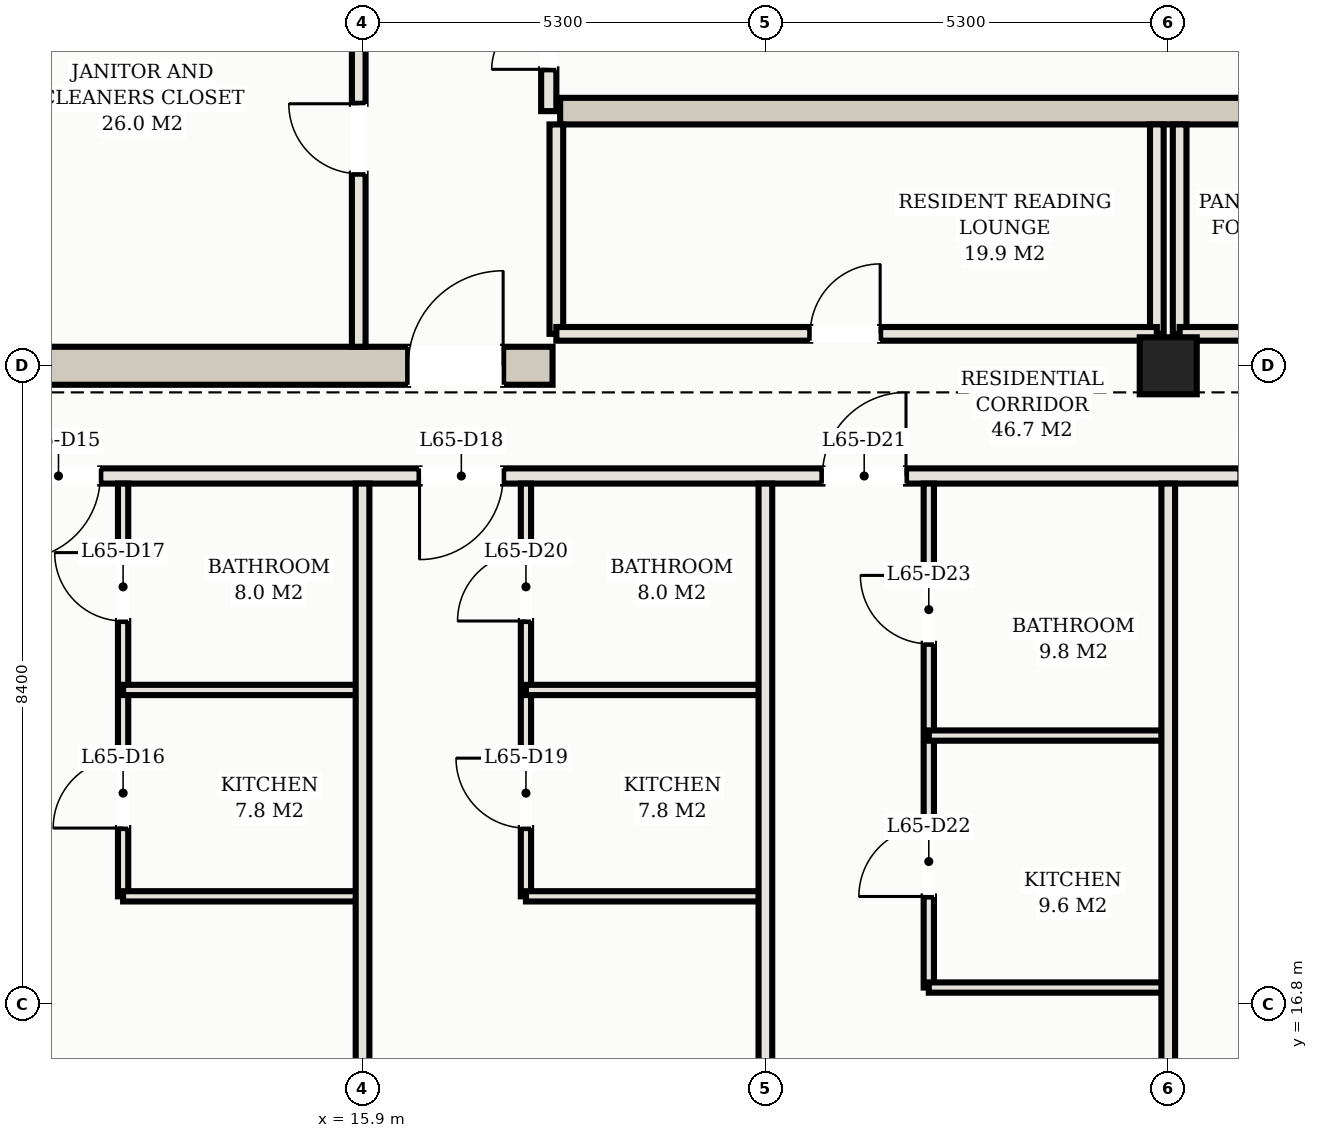
"""IFC4 building model, lengths in metres.
Left out: names, types, materials, properties, quantities, classifications, styles, units other than length and angle.
Written with IfcOpenShell. Run it as: python <this file> out.ifc"""

import sys

from ifc_helpers import new_model, si_unit, direction, frame, frame_2d, origin, origin_2d, place, context, subcontext, project, spatial, rectangle, hollow_rectangle, extrude, element, fill, save


model = new_model("IFC4")
c1 = context("Model", 3, precision=1e-05, world=origin(), true_north=direction((0.0, 1.0)))
c2 = subcontext(c1, "Body", "Model", "MODEL_VIEW")
j1 = project(units=[si_unit("LENGTHUNIT", "METRE"), si_unit("PLANEANGLEUNIT", "RADIAN")], contexts=[c1])
p1 = place(None, origin())
s1 = spatial("IfcSite", under=j1, at=p1, CompositionType="ELEMENT")
p2 = place(p1, origin())
s2 = spatial("IfcBuilding", under=s1, at=p2, CompositionType="ELEMENT")
p3 = place(p2, frame((0.0, 0.0, 236.3)))
s3 = spatial("IfcBuildingStorey", under=s2, at=p3, CompositionType="ELEMENT", Elevation=236.3)
p4 = place(p3, frame((10.35, 25.2, 0.0), z_axis=(0.0, 0.0, 1.0), x_axis=(1.0, 0.0, 0.0)))
e1 = element("IfcWall", 1, at=p4, inside=s3, PredefinedType="SHEAR", context=c2, shape_type="SweptSolid", body=[
    extrude(rectangle(XDim=8.05, YDim=0.5, at=frame_2d((4.025, 0.0))), origin(), (0.0, 0.0, 1.0), 3.11),
])
p5 = place(p4, frame((6.15, 0.0, 0.0)))
e2 = element("IfcOpeningElement", 2, at=p5, cuts=e1, PredefinedType="OPENING", context=c2, shape_type="SweptSolid", body=[
    extrude(rectangle(XDim=1.25, YDim=2.2, at=frame_2d((0.625, 1.1))), frame((0.0, 0.26, 0.0), z_axis=(0.0, -1.0, 0.0), x_axis=(1.0, 0.0, 0.0)), (0.0, 0.0, 1.0), 0.52),
])
p6 = place(p3, frame((18.5, 28.55, 0.0), z_axis=(0.0, 0.0, 1.0), x_axis=(1.0, 0.0, 0.0)))
e3 = element("IfcWall", 3, at=p6, inside=s3, PredefinedType="SHEAR", context=c2, shape_type="SweptSolid", body=[
    extrude(rectangle(XDim=16.0, YDim=0.35, at=frame_2d((8.0, 0.0))), origin(), (0.0, 0.0, 1.0), 3.11),
])
p7 = place(p3, frame((26.5, 25.2, 0.0), z_axis=(0.0, 0.0, 1.0), x_axis=(1.0, 0.0, 0.0)))
e4 = element("IfcColumn", 4, at=p7, inside=s3, PredefinedType="COLUMN", context=c2, shape_type="SweptSolid", body=[
    extrude(hollow_rectangle(XDim=0.75, YDim=0.75, WallThickness=0.025, at=origin_2d()), origin(), (0.0, 0.0, 1.0), 3.3),
])
p8 = place(p3, frame((15.85, 25.45, 0.0), z_axis=(0.0, 0.0, 1.0), x_axis=(0.0, 1.0, 0.0)))
e5 = element("IfcWall", 5, at=p8, inside=s3, PredefinedType="PARTITIONING", context=c2, shape_type="SweptSolid", body=[
    extrude(rectangle(XDim=5.475, YDim=0.18, at=frame_2d((2.738, 0.0))), origin(), (0.0, 0.0, 1.0), 2.45),
])
p9 = place(p8, frame((2.277, 0.0, 0.0)))
e6 = element("IfcOpeningElement", 6, at=p9, cuts=e5, PredefinedType="OPENING", context=c2, shape_type="SweptSolid", body=[
    extrude(rectangle(XDim=0.92, YDim=2.15, at=frame_2d((0.46, 1.075))), frame((0.0, 0.1, 0.0), z_axis=(0.0, -1.0, 0.0), x_axis=(1.0, 0.0, 0.0)), (0.0, 0.0, 1.0), 0.2),
])
p10 = place(p3, frame((18.35, 28.55, 0.0), z_axis=(0.0, 0.0, 1.0), x_axis=(0.0, 1.0, 0.0)))
e7 = element("IfcWall", 7, at=p10, inside=s3, PredefinedType="PARTITIONING", context=c2, shape_type="SweptSolid", body=[
    extrude(rectangle(XDim=2.6, YDim=0.2, at=frame_2d((1.3, 0.0))), origin(), (0.0, 0.0, 1.0), 2.45),
])
p11 = place(p10, frame((0.55, 0.0, 0.0)))
e8 = element("IfcOpeningElement", 8, at=p11, cuts=e7, PredefinedType="OPENING", context=c2, shape_type="SweptSolid", body=[
    extrude(rectangle(XDim=1.5, YDim=2.25, at=frame_2d((0.75, 1.125))), frame((0.0, 0.11, 0.0), z_axis=(0.0, -1.0, 0.0), x_axis=(1.0, 0.0, 0.0)), (0.0, 0.0, 1.0), 0.22),
])
for number, where, z_axis, x_axis in (
    (9, (18.45, 25.62, 0.0), (0.0, 0.0, 1.0), (0.0, 1.0, 0.0)),
    (10, (26.35, 25.62, 0.0), (0.0, 0.0, 1.0), (0.0, 1.0, 0.0)),
):
    element("IfcWall", number, at=place(p3, frame(where, z_axis=z_axis, x_axis=x_axis)), inside=s3, PredefinedType="PARTITIONING", context=c2, shape_type="SweptSolid", body=[
        extrude(rectangle(XDim=2.755, YDim=0.18, at=frame_2d((1.377, 0.0))), origin(), (0.0, 0.0, 1.0), 2.45),
    ])
p12 = place(p3, frame((18.45, 25.62, 0.0), z_axis=(0.0, 0.0, 1.0), x_axis=(1.0, 0.0, 0.0)))
e11 = element("IfcWall", 11, at=p12, inside=s3, PredefinedType="PARTITIONING", context=c2, shape_type="SweptSolid", body=[
    extrude(rectangle(XDim=7.9, YDim=0.18, at=frame_2d((3.95, 0.0))), origin(), (0.0, 0.0, 1.0), 2.45),
])
p13 = place(p12, frame((3.34, 0.0, 0.0)))
e12 = element("IfcOpeningElement", 12, at=p13, cuts=e11, PredefinedType="OPENING", context=c2, shape_type="SweptSolid", body=[
    extrude(rectangle(XDim=0.92, YDim=2.15, at=frame_2d((0.46, 1.075))), frame((0.0, 0.1, 0.0), z_axis=(0.0, -1.0, 0.0), x_axis=(1.0, 0.0, 0.0)), (0.0, 0.0, 1.0), 0.2),
])
p14 = place(p3, frame((26.65, 25.62, 0.0), z_axis=(0.0, 0.0, 1.0), x_axis=(0.0, 1.0, 0.0)))
e13 = element("IfcWall", 13, at=p14, inside=s3, PredefinedType="PARTITIONING", context=c2, shape_type="SweptSolid", body=[
    extrude(rectangle(XDim=2.755, YDim=0.18, at=frame_2d((1.377, 0.0))), origin(), (0.0, 0.0, 1.0), 2.45),
])
p15 = place(p3, frame((26.65, 25.62, 0.0), z_axis=(0.0, 0.0, 1.0), x_axis=(1.0, 0.0, 0.0)))
e14 = element("IfcWall", 14, at=p15, inside=s3, PredefinedType="PARTITIONING", context=c2, shape_type="SweptSolid", body=[
    extrude(rectangle(XDim=7.9, YDim=0.18, at=frame_2d((3.95, 0.0))), origin(), (0.0, 0.0, 1.0), 2.45),
])
p16 = place(p15, frame((3.34, 0.0, 0.0)))
e15 = element("IfcOpeningElement", 15, at=p16, cuts=e14, PredefinedType="OPENING", context=c2, shape_type="SweptSolid", body=[
    extrude(rectangle(XDim=0.92, YDim=2.15, at=frame_2d((0.46, 1.075))), frame((0.0, 0.1, 0.0), z_axis=(0.0, -1.0, 0.0), x_axis=(1.0, 0.0, 0.0)), (0.0, 0.0, 1.0), 0.2),
])
p17 = place(p3, frame((8.6, 23.75, 0.0), z_axis=(0.0, 0.0, 1.0), x_axis=(1.0, 0.0, 0.0)))
e16 = element("IfcWall", 16, at=p17, inside=s3, PredefinedType="PARTITIONING", context=c2, shape_type="SweptSolid", body=[
    extrude(rectangle(XDim=35.8, YDim=0.2, at=frame_2d((17.9, 0.0))), origin(), (0.0, 0.0, 1.0), 2.45),
])
p18 = place(p17, frame((2.75, 0.0, 0.0)))
e17 = element("IfcOpeningElement", 17, at=p18, cuts=e16, PredefinedType="OPENING", context=c2, shape_type="SweptSolid", body=[
    extrude(rectangle(XDim=1.1, YDim=2.25, at=frame_2d((0.55, 1.125))), frame((0.0, 0.11, 0.0), z_axis=(0.0, -1.0, 0.0), x_axis=(1.0, 0.0, 0.0)), (0.0, 0.0, 1.0), 0.22),
])
p19 = place(p17, frame((8.05, 0.0, 0.0)))
e18 = element("IfcOpeningElement", 18, at=p19, cuts=e16, PredefinedType="OPENING", context=c2, shape_type="SweptSolid", body=[
    extrude(rectangle(XDim=1.1, YDim=2.25, at=frame_2d((0.55, 1.125))), frame((0.0, 0.11, 0.0), z_axis=(0.0, -1.0, 0.0), x_axis=(1.0, 0.0, 0.0)), (0.0, 0.0, 1.0), 0.22),
])
p20 = place(p17, frame((13.35, 0.0, 0.0)))
e19 = element("IfcOpeningElement", 19, at=p20, cuts=e16, PredefinedType="OPENING", context=c2, shape_type="SweptSolid", body=[
    extrude(rectangle(XDim=1.1, YDim=2.25, at=frame_2d((0.55, 1.125))), frame((0.0, 0.11, 0.0), z_axis=(0.0, -1.0, 0.0), x_axis=(1.0, 0.0, 0.0)), (0.0, 0.0, 1.0), 0.22),
])
p21 = place(p17, frame((18.85, 0.0, 0.0)))
e20 = element("IfcOpeningElement", 20, at=p21, cuts=e16, PredefinedType="OPENING", context=c2, shape_type="SweptSolid", body=[
    extrude(rectangle(XDim=1.1, YDim=2.25, at=frame_2d((0.55, 1.125))), frame((0.0, 0.11, 0.0), z_axis=(0.0, -1.0, 0.0), x_axis=(1.0, 0.0, 0.0)), (0.0, 0.0, 1.0), 0.22),
])
p22 = place(p17, frame((23.95, 0.0, 0.0)))
e21 = element("IfcOpeningElement", 21, at=p22, cuts=e16, PredefinedType="OPENING", context=c2, shape_type="SweptSolid", body=[
    extrude(rectangle(XDim=1.1, YDim=2.25, at=frame_2d((0.55, 1.125))), frame((0.0, 0.11, 0.0), z_axis=(0.0, -1.0, 0.0), x_axis=(1.0, 0.0, 0.0)), (0.0, 0.0, 1.0), 0.22),
])
p23 = place(p17, frame((29.25, 0.0, 0.0)))
e22 = element("IfcOpeningElement", 22, at=p23, cuts=e16, PredefinedType="OPENING", context=c2, shape_type="SweptSolid", body=[
    extrude(rectangle(XDim=1.1, YDim=2.25, at=frame_2d((0.55, 1.125))), frame((0.0, 0.11, 0.0), z_axis=(0.0, -1.0, 0.0), x_axis=(1.0, 0.0, 0.0)), (0.0, 0.0, 1.0), 0.22),
])
p24 = place(p17, frame((0.505, 0.0, 0.0)))
e23 = element("IfcOpeningElement", 23, at=p24, cuts=e16, PredefinedType="OPENING", context=c2, shape_type="SweptSolid", body=[
    extrude(rectangle(XDim=0.9, YDim=2.15, at=frame_2d((0.45, 1.075))), frame((0.0, 0.11, 0.0), z_axis=(0.0, -1.0, 0.0), x_axis=(1.0, 0.0, 0.0)), (0.0, 0.0, 1.0), 0.22),
])
p25 = place(p17, frame((34.395, 0.0, 0.0)))
e24 = element("IfcOpeningElement", 24, at=p25, cuts=e16, PredefinedType="OPENING", context=c2, shape_type="SweptSolid", body=[
    extrude(rectangle(XDim=0.9, YDim=2.15, at=frame_2d((0.45, 1.075))), frame((0.0, 0.11, 0.0), z_axis=(0.0, -1.0, 0.0), x_axis=(1.0, 0.0, 0.0)), (0.0, 0.0, 1.0), 0.22),
])
p26 = place(p3, frame((12.75, 18.22, 0.0), z_axis=(0.0, 0.0, 1.0), x_axis=(0.0, 1.0, 0.0)))
e25 = element("IfcWall", 25, at=p26, inside=s3, PredefinedType="PARTITIONING", context=c2, shape_type="SweptSolid", body=[
    extrude(rectangle(XDim=5.43, YDim=0.135, at=frame_2d((2.715, 0.0))), origin(), (0.0, 0.0, 1.0), 2.45),
])
p27 = place(p26, frame((0.898, 0.0, 0.0)))
e26 = element("IfcOpeningElement", 26, at=p27, cuts=e25, PredefinedType="OPENING", context=c2, shape_type="SweptSolid", body=[
    extrude(rectangle(XDim=0.92, YDim=2.15, at=frame_2d((0.46, 1.075))), frame((0.0, 0.078, 0.0), z_axis=(0.0, -1.0, 0.0), x_axis=(1.0, 0.0, 0.0)), (0.0, 0.0, 1.0), 0.155),
])
p28 = place(p26, frame((3.622, 0.0, 0.0)))
e27 = element("IfcOpeningElement", 27, at=p28, cuts=e25, PredefinedType="OPENING", context=c2, shape_type="SweptSolid", body=[
    extrude(rectangle(XDim=0.9, YDim=2.15, at=frame_2d((0.45, 1.075))), frame((0.0, 0.078, 0.0), z_axis=(0.0, -1.0, 0.0), x_axis=(1.0, 0.0, 0.0)), (0.0, 0.0, 1.0), 0.155),
])
for number, where, z_axis, x_axis in (
    (28, (12.75, 18.22, 0.0), (0.0, 0.0, 1.0), (1.0, 0.0, 0.0)),
    (29, (12.75, 20.935, 0.0), (0.0, 0.0, 1.0), (1.0, 0.0, 0.0)),
):
    element("IfcWall", number, at=place(p3, frame(where, z_axis=z_axis, x_axis=x_axis)), inside=s3, PredefinedType="PARTITIONING", context=c2, shape_type="SweptSolid", body=[
        extrude(rectangle(XDim=3.15, YDim=0.135, at=frame_2d((1.575, 0.0))), origin(), (0.0, 0.0, 1.0), 2.45),
    ])
p29 = place(p3, frame((15.9, 8.42, 0.0), z_axis=(0.0, 0.0, 1.0), x_axis=(0.0, 1.0, 0.0)))
e30 = element("IfcWall", 30, at=p29, inside=s3, PredefinedType="PARTITIONING", context=c2, shape_type="SweptSolid", body=[
    extrude(rectangle(XDim=15.23, YDim=0.18, at=frame_2d((7.615, 0.0))), origin(), (0.0, 0.0, 1.0), 2.45),
])
p30 = place(p3, frame((18.05, 18.22, 0.0), z_axis=(0.0, 0.0, 1.0), x_axis=(0.0, 1.0, 0.0)))
e31 = element("IfcWall", 31, at=p30, inside=s3, PredefinedType="PARTITIONING", context=c2, shape_type="SweptSolid", body=[
    extrude(rectangle(XDim=5.43, YDim=0.135, at=frame_2d((2.715, 0.0))), origin(), (0.0, 0.0, 1.0), 2.45),
])
p31 = place(p30, frame((0.898, 0.0, 0.0)))
e32 = element("IfcOpeningElement", 32, at=p31, cuts=e31, PredefinedType="OPENING", context=c2, shape_type="SweptSolid", body=[
    extrude(rectangle(XDim=0.92, YDim=2.15, at=frame_2d((0.46, 1.075))), frame((0.0, 0.078, 0.0), z_axis=(0.0, -1.0, 0.0), x_axis=(1.0, 0.0, 0.0)), (0.0, 0.0, 1.0), 0.155),
])
p32 = place(p30, frame((3.622, 0.0, 0.0)))
e33 = element("IfcOpeningElement", 33, at=p32, cuts=e31, PredefinedType="OPENING", context=c2, shape_type="SweptSolid", body=[
    extrude(rectangle(XDim=0.9, YDim=2.15, at=frame_2d((0.45, 1.075))), frame((0.0, 0.078, 0.0), z_axis=(0.0, -1.0, 0.0), x_axis=(1.0, 0.0, 0.0)), (0.0, 0.0, 1.0), 0.155),
])
for number, where, z_axis, x_axis in (
    (34, (18.05, 18.22, 0.0), (0.0, 0.0, 1.0), (1.0, 0.0, 0.0)),
    (35, (18.05, 20.935, 0.0), (0.0, 0.0, 1.0), (1.0, 0.0, 0.0)),
):
    element("IfcWall", number, at=place(p3, frame(where, z_axis=z_axis, x_axis=x_axis)), inside=s3, PredefinedType="PARTITIONING", context=c2, shape_type="SweptSolid", body=[
        extrude(rectangle(XDim=3.15, YDim=0.135, at=frame_2d((1.575, 0.0))), origin(), (0.0, 0.0, 1.0), 2.45),
    ])
p33 = place(p3, frame((21.2, 8.098, 0.0), z_axis=(0.0, 0.0, 1.0), x_axis=(0.0, 1.0, 0.0)))
e36 = element("IfcWall", 36, at=p33, inside=s3, PredefinedType="PARTITIONING", context=c2, shape_type="SweptSolid", body=[
    extrude(rectangle(XDim=15.552, YDim=0.18, at=frame_2d((7.776, 0.0))), origin(), (0.0, 0.0, 1.0), 2.45),
])
p34 = place(p3, frame((23.35, 17.02, 0.0), z_axis=(0.0, 0.0, 1.0), x_axis=(0.0, 1.0, 0.0)))
e37 = element("IfcWall", 37, at=p34, inside=s3, PredefinedType="PARTITIONING", context=c2, shape_type="SweptSolid", body=[
    extrude(rectangle(XDim=6.63, YDim=0.135, at=frame_2d((3.315, 0.0))), origin(), (0.0, 0.0, 1.0), 2.45),
])
p35 = place(p34, frame((1.198, 0.0, 0.0)))
e38 = element("IfcOpeningElement", 38, at=p35, cuts=e37, PredefinedType="OPENING", context=c2, shape_type="SweptSolid", body=[
    extrude(rectangle(XDim=0.92, YDim=2.15, at=frame_2d((0.46, 1.075))), frame((0.0, 0.078, 0.0), z_axis=(0.0, -1.0, 0.0), x_axis=(1.0, 0.0, 0.0)), (0.0, 0.0, 1.0), 0.155),
])
p36 = place(p34, frame((4.522, 0.0, 0.0)))
e39 = element("IfcOpeningElement", 39, at=p36, cuts=e37, PredefinedType="OPENING", context=c2, shape_type="SweptSolid", body=[
    extrude(rectangle(XDim=0.9, YDim=2.15, at=frame_2d((0.45, 1.075))), frame((0.0, 0.078, 0.0), z_axis=(0.0, -1.0, 0.0), x_axis=(1.0, 0.0, 0.0)), (0.0, 0.0, 1.0), 0.155),
])
for number, where, z_axis, x_axis in (
    (40, (23.35, 17.02, 0.0), (0.0, 0.0, 1.0), (1.0, 0.0, 0.0)),
    (41, (23.35, 20.335, 0.0), (0.0, 0.0, 1.0), (1.0, 0.0, 0.0)),
):
    element("IfcWall", number, at=place(p3, frame(where, z_axis=z_axis, x_axis=x_axis)), inside=s3, PredefinedType="PARTITIONING", context=c2, shape_type="SweptSolid", body=[
        extrude(rectangle(XDim=3.15, YDim=0.135, at=frame_2d((1.575, 0.0))), origin(), (0.0, 0.0, 1.0), 2.45),
    ])
p37 = place(p3, frame((26.5, 6.92, 0.0), z_axis=(0.0, 0.0, 1.0), x_axis=(0.0, 1.0, 0.0)))
e42 = element("IfcWall", 42, at=p37, inside=s3, PredefinedType="PARTITIONING", context=c2, shape_type="SweptSolid", body=[
    extrude(rectangle(XDim=16.73, YDim=0.18, at=frame_2d((8.365, 0.0))), origin(), (0.0, 0.0, 1.0), 2.45),
])
p38 = place(p5, origin())
e43 = element("IfcDoor", 43, at=p38, inside=s3, OperationType="SINGLE_SWING_RIGHT", PredefinedType="DOOR", context=c2, shape_type="SweptSolid", body=[
    extrude(rectangle(XDim=1.25, YDim=2.2, at=frame_2d((0.625, 1.1))), frame((0.0, 0.025, 0.0), z_axis=(0.0, -1.0, 0.0), x_axis=(1.0, 0.0, 0.0)), (0.0, 0.0, 1.0), 0.05),
])
fill(e2, e43)
p39 = place(p9, origin())
e44 = element("IfcDoor", 44, at=p39, inside=s3, OperationType="SINGLE_SWING_RIGHT", PredefinedType="DOOR", context=c2, shape_type="SweptSolid", body=[
    extrude(rectangle(XDim=0.92, YDim=2.15, at=frame_2d((0.46, 1.075))), frame((0.0, 0.025, 0.0), z_axis=(0.0, -1.0, 0.0), x_axis=(1.0, 0.0, 0.0)), (0.0, 0.0, 1.0), 0.05),
])
fill(e6, e44)
p40 = place(p11, origin())
e45 = element("IfcDoor", 45, at=p40, inside=s3, OperationType="DOUBLE_DOOR_SINGLE_SWING", PredefinedType="DOOR", context=c2, shape_type="SweptSolid", body=[
    extrude(rectangle(XDim=1.5, YDim=2.25, at=frame_2d((0.75, 1.125))), frame((0.0, 0.025, 0.0), z_axis=(0.0, -1.0, 0.0), x_axis=(1.0, 0.0, 0.0)), (0.0, 0.0, 1.0), 0.05),
])
fill(e8, e45)
p41 = place(p13, origin())
e46 = element("IfcDoor", 46, at=p41, inside=s3, OperationType="SINGLE_SWING_RIGHT", PredefinedType="DOOR", context=c2, shape_type="SweptSolid", body=[
    extrude(rectangle(XDim=0.92, YDim=2.15, at=frame_2d((0.46, 1.075))), frame((0.0, 0.025, 0.0), z_axis=(0.0, -1.0, 0.0), x_axis=(1.0, 0.0, 0.0)), (0.0, 0.0, 1.0), 0.05),
])
fill(e12, e46)
p42 = place(p18, frame((1.1, 0.0, 0.0), z_axis=(0.0, 0.0, 1.0), x_axis=(-1.0, 0.0, 0.0)))
e47 = element("IfcDoor", 47, at=p42, inside=s3, OperationType="SINGLE_SWING_RIGHT", PredefinedType="DOOR", context=c2, shape_type="SweptSolid", body=[
    extrude(rectangle(XDim=1.1, YDim=2.25, at=frame_2d((0.55, 1.125))), frame((0.0, 0.025, 0.0), z_axis=(0.0, -1.0, 0.0), x_axis=(1.0, 0.0, 0.0)), (0.0, 0.0, 1.0), 0.05),
])
fill(e17, e47)
p43 = place(p27, origin())
e48 = element("IfcDoor", 48, at=p43, inside=s3, OperationType="SINGLE_SWING_LEFT", PredefinedType="DOOR", context=c2, shape_type="SweptSolid", body=[
    extrude(rectangle(XDim=0.92, YDim=2.15, at=frame_2d((0.46, 1.075))), frame((0.0, 0.025, 0.0), z_axis=(0.0, -1.0, 0.0), x_axis=(1.0, 0.0, 0.0)), (0.0, 0.0, 1.0), 0.05),
])
fill(e26, e48)
p44 = place(p28, origin())
e49 = element("IfcDoor", 49, at=p44, inside=s3, OperationType="SINGLE_SWING_RIGHT", PredefinedType="DOOR", context=c2, shape_type="SweptSolid", body=[
    extrude(rectangle(XDim=0.9, YDim=2.15, at=frame_2d((0.45, 1.075))), frame((0.0, 0.025, 0.0), z_axis=(0.0, -1.0, 0.0), x_axis=(1.0, 0.0, 0.0)), (0.0, 0.0, 1.0), 0.05),
])
fill(e27, e49)
p45 = place(p19, frame((1.1, 0.0, 0.0), z_axis=(0.0, 0.0, 1.0), x_axis=(-1.0, 0.0, 0.0)))
e50 = element("IfcDoor", 50, at=p45, inside=s3, OperationType="SINGLE_SWING_RIGHT", PredefinedType="DOOR", context=c2, shape_type="SweptSolid", body=[
    extrude(rectangle(XDim=1.1, YDim=2.25, at=frame_2d((0.55, 1.125))), frame((0.0, 0.025, 0.0), z_axis=(0.0, -1.0, 0.0), x_axis=(1.0, 0.0, 0.0)), (0.0, 0.0, 1.0), 0.05),
])
fill(e18, e50)
p46 = place(p31, origin())
e51 = element("IfcDoor", 51, at=p46, inside=s3, OperationType="SINGLE_SWING_RIGHT", PredefinedType="DOOR", context=c2, shape_type="SweptSolid", body=[
    extrude(rectangle(XDim=0.92, YDim=2.15, at=frame_2d((0.46, 1.075))), frame((0.0, 0.025, 0.0), z_axis=(0.0, -1.0, 0.0), x_axis=(1.0, 0.0, 0.0)), (0.0, 0.0, 1.0), 0.05),
])
fill(e32, e51)
p47 = place(p32, origin())
e52 = element("IfcDoor", 52, at=p47, inside=s3, OperationType="SINGLE_SWING_LEFT", PredefinedType="DOOR", context=c2, shape_type="SweptSolid", body=[
    extrude(rectangle(XDim=0.9, YDim=2.15, at=frame_2d((0.45, 1.075))), frame((0.0, 0.025, 0.0), z_axis=(0.0, -1.0, 0.0), x_axis=(1.0, 0.0, 0.0)), (0.0, 0.0, 1.0), 0.05),
])
fill(e33, e52)
p48 = place(p20, origin())
e53 = element("IfcDoor", 53, at=p48, inside=s3, OperationType="SINGLE_SWING_RIGHT", PredefinedType="DOOR", context=c2, shape_type="SweptSolid", body=[
    extrude(rectangle(XDim=1.1, YDim=2.25, at=frame_2d((0.55, 1.125))), frame((0.0, 0.025, 0.0), z_axis=(0.0, -1.0, 0.0), x_axis=(1.0, 0.0, 0.0)), (0.0, 0.0, 1.0), 0.05),
])
fill(e19, e53)
p49 = place(p35, origin())
e54 = element("IfcDoor", 54, at=p49, inside=s3, OperationType="SINGLE_SWING_LEFT", PredefinedType="DOOR", context=c2, shape_type="SweptSolid", body=[
    extrude(rectangle(XDim=0.92, YDim=2.15, at=frame_2d((0.46, 1.075))), frame((0.0, 0.025, 0.0), z_axis=(0.0, -1.0, 0.0), x_axis=(1.0, 0.0, 0.0)), (0.0, 0.0, 1.0), 0.05),
])
fill(e38, e54)
p50 = place(p36, origin())
e55 = element("IfcDoor", 55, at=p50, inside=s3, OperationType="SINGLE_SWING_RIGHT", PredefinedType="DOOR", context=c2, shape_type="SweptSolid", body=[
    extrude(rectangle(XDim=0.9, YDim=2.15, at=frame_2d((0.45, 1.075))), frame((0.0, 0.025, 0.0), z_axis=(0.0, -1.0, 0.0), x_axis=(1.0, 0.0, 0.0)), (0.0, 0.0, 1.0), 0.05),
])
fill(e39, e55)
save(model, sys.argv[1])
